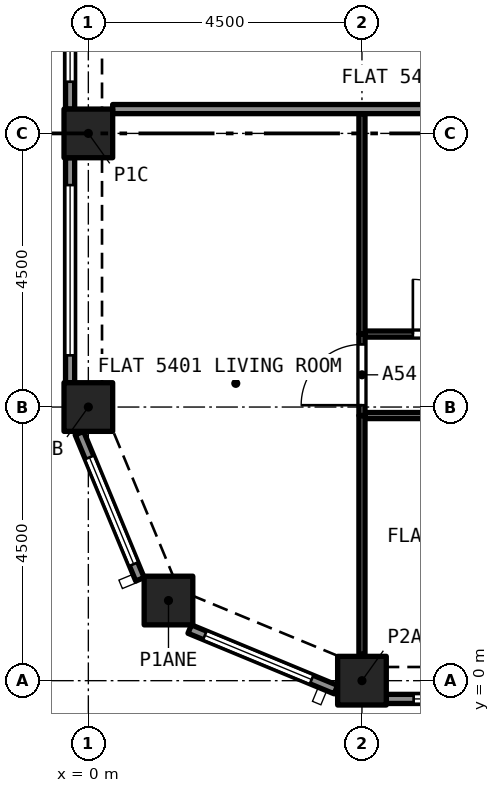
"""IFC4 building model, lengths in metres.
Left out: names, types, materials, properties, quantities, classifications, styles, units other than length and angle.
Written with IfcOpenShell. Run it as: python <this file> out.ifc"""

import sys

from ifc_helpers import new_model, si_unit, direction, frame, frame_2d, origin, origin_2d, place, context, subcontext, project, spatial, rectangle, extrude, element, fill, save


model = new_model("IFC4")
c1 = context("Model", 3, precision=1e-05, world=origin(), true_north=direction((0.0, 1.0)))
c2 = subcontext(c1, "Body", "Model", "MODEL_VIEW")
j1 = project(units=[si_unit("LENGTHUNIT", "METRE"), si_unit("PLANEANGLEUNIT", "RADIAN")], contexts=[c1])
p1 = place(None, origin())
s1 = spatial("IfcSite", under=j1, at=p1, CompositionType="ELEMENT")
p2 = place(p1, origin())
s2 = spatial("IfcBuilding", under=s1, at=p2, CompositionType="ELEMENT")
p3 = place(p2, frame((0.0, 0.0, 195.5)))
s3 = spatial("IfcBuildingStorey", under=s2, at=p3, CompositionType="ELEMENT", Elevation=195.5)
for number, where, z_axis, x_axis in (
    (1, (4.5, 0.0, 0.0), (0.0, 0.0, 1.0), (1.0, 0.0, 0.0)),
    (2, (1.318, 1.318, 0.0), (0.0, 0.0, 1.0), (1.0, 0.0, 0.0)),
    (3, (0.0, 4.5, 0.0), (0.0, 0.0, 1.0), (1.0, 0.0, 0.0)),
    (4, (0.0, 9.0, 0.0), (0.0, 0.0, 1.0), (1.0, 0.0, 0.0)),
):
    element("IfcColumn", number, at=place(p3, frame(where, z_axis=z_axis, x_axis=x_axis)), inside=s3, PredefinedType="COLUMN", context=c2, shape_type="SweptSolid", body=[
        extrude(rectangle(XDim=0.8, YDim=0.8, at=origin_2d()), origin(), (0.0, 0.0, 1.0), 3.2),
    ])
p4 = place(p3, frame((-0.3, 9.4, 0.0), z_axis=(0.0, 0.0, 1.0), x_axis=(0.0, 1.0, 0.0)))
e5 = element("IfcWall", 5, at=p4, inside=s3, PredefinedType="SOLIDWALL", context=c2, shape_type="SweptSolid", body=[
    extrude(rectangle(XDim=3.7, YDim=0.15, at=frame_2d((1.85, 0.0))), origin(), (0.0, 0.0, 1.0), 3.2),
])
p5 = place(p4, frame((0.45, 0.0, 0.45)))
e6 = element("IfcOpeningElement", 6, at=p5, cuts=e5, PredefinedType="OPENING", context=c2, shape_type="SweptSolid", body=[
    extrude(rectangle(XDim=2.8, YDim=1.95, at=frame_2d((1.4, 0.975))), frame((0.0, 0.085, 0.0), z_axis=(0.0, -1.0, 0.0), x_axis=(1.0, 0.0, 0.0)), (0.0, 0.0, 1.0), 0.17),
])
p6 = place(p3, frame((-0.3, 4.9, 0.0), z_axis=(0.0, 0.0, 1.0), x_axis=(0.0, 1.0, 0.0)))
e7 = element("IfcWall", 7, at=p6, inside=s3, PredefinedType="SOLIDWALL", context=c2, shape_type="SweptSolid", body=[
    extrude(rectangle(XDim=3.7, YDim=0.15, at=frame_2d((1.85, 0.0))), origin(), (0.0, 0.0, 1.0), 3.2),
])
p7 = place(p6, frame((0.45, 0.0, 0.45)))
e8 = element("IfcOpeningElement", 8, at=p7, cuts=e7, PredefinedType="OPENING", context=c2, shape_type="SweptSolid", body=[
    extrude(rectangle(XDim=2.8, YDim=1.95, at=frame_2d((1.4, 0.975))), frame((0.0, 0.085, 0.0), z_axis=(0.0, -1.0, 0.0), x_axis=(1.0, 0.0, 0.0)), (0.0, 0.0, 1.0), 0.17),
])
p8 = place(p3, frame((0.849, 1.667, 0.0), z_axis=(0.0, 0.0, 1.0), x_axis=(-0.382669406082, 0.923885342263, 0.0)))
e9 = element("IfcWall", 9, at=p8, inside=s3, PredefinedType="SOLIDWALL", context=c2, shape_type="SweptSolid", body=[
    extrude(rectangle(XDim=2.602, YDim=0.15, at=frame_2d((1.301, 0.0))), origin(), (0.0, 0.0, 1.0), 3.2),
])
p9 = place(p8, frame((0.27, 0.0, 0.45)))
e10 = element("IfcOpeningElement", 10, at=p9, cuts=e9, PredefinedType="OPENING", context=c2, shape_type="SweptSolid", body=[
    extrude(rectangle(XDim=1.9, YDim=1.95, at=frame_2d((0.95, 0.975))), frame((0.0, 0.085, 0.0), z_axis=(0.0, -1.0, 0.0), x_axis=(1.0, 0.0, 0.0)), (0.0, 0.0, 1.0), 0.17),
])
p10 = place(p3, frame((4.071, -0.147, 0.0), z_axis=(0.0, 0.0, 1.0), x_axis=(-0.923885342263, 0.382669406082, 0.0)))
e11 = element("IfcWall", 11, at=p10, inside=s3, PredefinedType="SOLIDWALL", context=c2, shape_type="SweptSolid", body=[
    extrude(rectangle(XDim=2.602, YDim=0.15, at=frame_2d((1.301, 0.0))), origin(), (0.0, 0.0, 1.0), 3.2),
])
p11 = place(p10, frame((0.432, 0.0, 0.45)))
e12 = element("IfcOpeningElement", 12, at=p11, cuts=e11, PredefinedType="OPENING", context=c2, shape_type="SweptSolid", body=[
    extrude(rectangle(XDim=1.9, YDim=1.95, at=frame_2d((0.95, 0.975))), frame((0.0, 0.085, 0.0), z_axis=(0.0, -1.0, 0.0), x_axis=(1.0, 0.0, 0.0)), (0.0, 0.0, 1.0), 0.17),
])
p12 = place(p3, frame((8.6, -0.3, 0.0), z_axis=(0.0, 0.0, 1.0), x_axis=(-1.0, 0.0, 0.0)))
e13 = element("IfcWall", 13, at=p12, inside=s3, PredefinedType="SOLIDWALL", context=c2, shape_type="SweptSolid", body=[
    extrude(rectangle(XDim=3.7, YDim=0.15, at=frame_2d((1.85, 0.0))), origin(), (0.0, 0.0, 1.0), 3.2),
])
p13 = place(p12, frame((0.45, 0.0, 0.45)))
e14 = element("IfcOpeningElement", 14, at=p13, cuts=e13, PredefinedType="OPENING", context=c2, shape_type="SweptSolid", body=[
    extrude(rectangle(XDim=2.8, YDim=1.95, at=frame_2d((1.4, 0.975))), frame((0.0, 0.085, 0.0), z_axis=(0.0, -1.0, 0.0), x_axis=(1.0, 0.0, 0.0)), (0.0, 0.0, 1.0), 0.17),
])
p14 = place(p3, frame((9.0, 4.36, 0.0), z_axis=(0.0, 0.0, 1.0), x_axis=(-1.0, 0.0, 0.0)))
e15 = element("IfcWall", 15, at=p14, inside=s3, PredefinedType="PARTITIONING", context=c2, shape_type="SweptSolid", body=[
    extrude(rectangle(XDim=4.45, YDim=0.1, at=frame_2d((2.225, 0.0))), origin(), (0.0, 0.0, 1.0), 2.9),
])
p15 = place(p14, frame((1.8, 0.0, 0.0)))
e16 = element("IfcOpeningElement", 16, at=p15, cuts=e15, PredefinedType="OPENING", context=c2, shape_type="SweptSolid", body=[
    extrude(rectangle(XDim=0.9, YDim=2.1, at=frame_2d((0.45, 1.05))), frame((0.0, 0.06, 0.0), z_axis=(0.0, -1.0, 0.0), x_axis=(1.0, 0.0, 0.0)), (0.0, 0.0, 1.0), 0.12),
])
p16 = place(p3, frame((4.5, 0.433, 0.0), z_axis=(0.0, 0.0, 1.0), x_axis=(0.0, 1.0, 0.0)))
e17 = element("IfcWall", 17, at=p16, inside=s3, PredefinedType="PARTITIONING", context=c2, shape_type="SweptSolid", body=[
    extrude(rectangle(XDim=3.927, YDim=0.1, at=frame_2d((1.964, 0.0))), origin(), (0.0, 0.0, 1.0), 2.9),
])
p17 = place(p3, frame((4.55, 5.7, 0.0), z_axis=(0.0, 0.0, 1.0), x_axis=(1.0, 0.0, 0.0)))
e18 = element("IfcWall", 18, at=p17, inside=s3, PredefinedType="PARTITIONING", context=c2, shape_type="SweptSolid", body=[
    extrude(rectangle(XDim=2.575, YDim=0.1, at=frame_2d((1.288, 0.0))), origin(), (0.0, 0.0, 1.0), 2.9),
])
p18 = place(p17, frame((0.788, 0.0, 0.0)))
e19 = element("IfcOpeningElement", 19, at=p18, cuts=e18, PredefinedType="OPENING", context=c2, shape_type="SweptSolid", body=[
    extrude(rectangle(XDim=0.9, YDim=2.1, at=frame_2d((0.45, 1.05))), frame((0.0, 0.06, 0.0), z_axis=(0.0, -1.0, 0.0), x_axis=(1.0, 0.0, 0.0)), (0.0, 0.0, 1.0), 0.12),
])
p19 = place(p3, frame((4.5, 4.36, 0.0), z_axis=(0.0, 0.0, 1.0), x_axis=(0.0, 1.0, 0.0)))
e20 = element("IfcWall", 20, at=p19, inside=s3, PredefinedType="PARTITIONING", context=c2, shape_type="SweptSolid", body=[
    extrude(rectangle(XDim=1.34, YDim=0.1, at=frame_2d((0.67, 0.0))), origin(), (0.0, 0.0, 1.0), 2.9),
])
p20 = place(p19, frame((0.17, 0.0, 0.0)))
e21 = element("IfcOpeningElement", 21, at=p20, cuts=e20, PredefinedType="OPENING", context=c2, shape_type="SweptSolid", body=[
    extrude(rectangle(XDim=1.0, YDim=2.1, at=frame_2d((0.5, 1.05))), frame((0.0, 0.06, 0.0), z_axis=(0.0, -1.0, 0.0), x_axis=(1.0, 0.0, 0.0)), (0.0, 0.0, 1.0), 0.12),
])
p21 = place(p3, frame((4.5, 5.7, 0.0), z_axis=(0.0, 0.0, 1.0), x_axis=(0.0, 1.0, 0.0)))
e22 = element("IfcWall", 22, at=p21, inside=s3, PredefinedType="PARTITIONING", context=c2, shape_type="SweptSolid", body=[
    extrude(rectangle(XDim=3.625, YDim=0.1, at=frame_2d((1.812, 0.0))), origin(), (0.0, 0.0, 1.0), 2.9),
])
p22 = place(p3, frame((0.4, 9.4, 0.0), z_axis=(0.0, 0.0, 1.0), x_axis=(1.0, 0.0, 0.0)))
e23 = element("IfcWall", 23, at=p22, inside=s3, PredefinedType="PARTITIONING", context=c2, shape_type="SweptSolid", body=[
    extrude(rectangle(XDim=6.675, YDim=0.15, at=frame_2d((3.337, 0.0))), origin(), (0.0, 0.0, 1.0), 2.9),
])
p23 = place(p5, origin())
e24 = element("IfcWindow", 24, at=p23, inside=s3, PartitioningType="SINGLE_PANEL", PredefinedType="WINDOW", context=c2, shape_type="SweptSolid", body=[
    extrude(rectangle(XDim=2.8, YDim=1.95, at=frame_2d((1.4, 0.975))), frame((0.0, 0.03, 0.0), z_axis=(0.0, -1.0, 0.0), x_axis=(1.0, 0.0, 0.0)), (0.0, 0.0, 1.0), 0.06),
])
fill(e6, e24)
p24 = place(p7, origin())
e25 = element("IfcWindow", 25, at=p24, inside=s3, PartitioningType="SINGLE_PANEL", PredefinedType="WINDOW", context=c2, shape_type="SweptSolid", body=[
    extrude(rectangle(XDim=2.8, YDim=1.95, at=frame_2d((1.4, 0.975))), frame((0.0, 0.03, 0.0), z_axis=(0.0, -1.0, 0.0), x_axis=(1.0, 0.0, 0.0)), (0.0, 0.0, 1.0), 0.06),
])
fill(e8, e25)
p25 = place(p9, origin())
e26 = element("IfcWindow", 26, at=p25, inside=s3, PartitioningType="SINGLE_PANEL", PredefinedType="WINDOW", context=c2, shape_type="SweptSolid", body=[
    extrude(rectangle(XDim=1.9, YDim=1.95, at=frame_2d((0.95, 0.975))), frame((0.0, 0.03, 0.0), z_axis=(0.0, -1.0, 0.0), x_axis=(1.0, 0.0, 0.0)), (0.0, 0.0, 1.0), 0.06),
])
fill(e10, e26)
p26 = place(p11, origin())
e27 = element("IfcWindow", 27, at=p26, inside=s3, PartitioningType="SINGLE_PANEL", PredefinedType="WINDOW", context=c2, shape_type="SweptSolid", body=[
    extrude(rectangle(XDim=1.9, YDim=1.95, at=frame_2d((0.95, 0.975))), frame((0.0, 0.03, 0.0), z_axis=(0.0, -1.0, 0.0), x_axis=(1.0, 0.0, 0.0)), (0.0, 0.0, 1.0), 0.06),
])
fill(e12, e27)
p27 = place(p13, origin())
e28 = element("IfcWindow", 28, at=p27, inside=s3, PartitioningType="SINGLE_PANEL", PredefinedType="WINDOW", context=c2, shape_type="SweptSolid", body=[
    extrude(rectangle(XDim=2.8, YDim=1.95, at=frame_2d((1.4, 0.975))), frame((0.0, 0.03, 0.0), z_axis=(0.0, -1.0, 0.0), x_axis=(1.0, 0.0, 0.0)), (0.0, 0.0, 1.0), 0.06),
])
fill(e14, e28)
p28 = place(p18, origin())
e29 = element("IfcDoor", 29, at=p28, inside=s3, OperationType="SINGLE_SWING_LEFT", PredefinedType="DOOR", context=c2, shape_type="SweptSolid", body=[
    extrude(rectangle(XDim=0.9, YDim=2.1, at=frame_2d((0.45, 1.05))), frame((0.0, 0.025, 0.0), z_axis=(0.0, -1.0, 0.0), x_axis=(1.0, 0.0, 0.0)), (0.0, 0.0, 1.0), 0.05),
])
fill(e19, e29)
p29 = place(p20, origin())
e30 = element("IfcDoor", 30, at=p29, inside=s3, OperationType="SINGLE_SWING_RIGHT", PredefinedType="DOOR", context=c2, shape_type="SweptSolid", body=[
    extrude(rectangle(XDim=1.0, YDim=2.1, at=frame_2d((0.5, 1.05))), frame((0.0, 0.025, 0.0), z_axis=(0.0, -1.0, 0.0), x_axis=(1.0, 0.0, 0.0)), (0.0, 0.0, 1.0), 0.05),
])
fill(e21, e30)
save(model, sys.argv[1])
